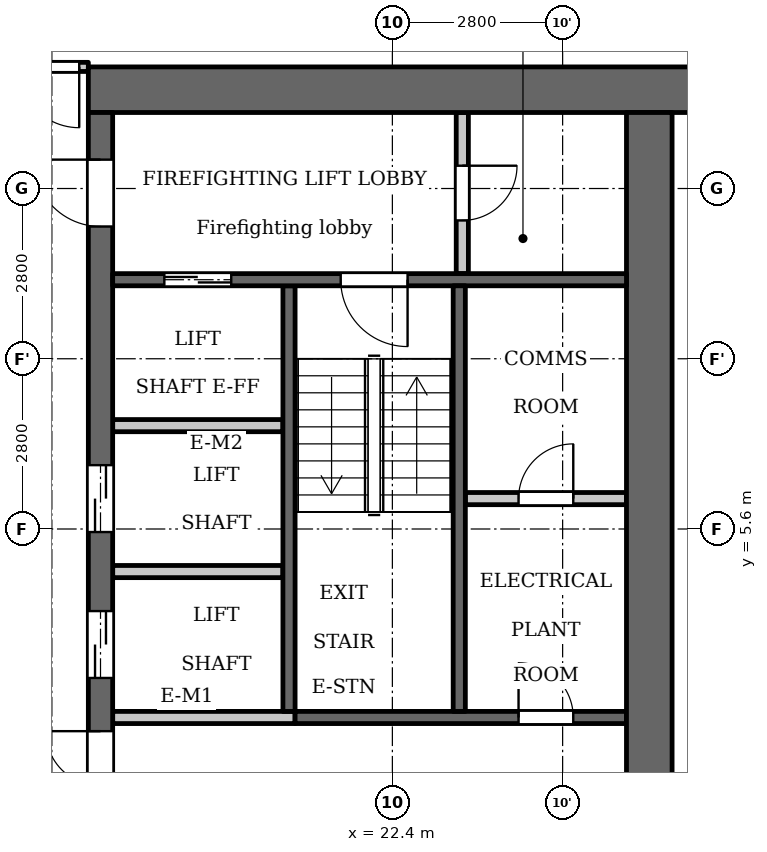
"""IFC4 building model, lengths in metres.
Left out: names, types, materials, properties, quantities, classifications, styles, units other than length and angle.
Written with IfcOpenShell. Run it as: python <this file> out.ifc"""

import sys

from ifc_helpers import new_model, si_unit, direction, frame, frame_2d, origin, place, context, subcontext, project, spatial, rectangle, extrude, element, fill, save


model = new_model("IFC4")
c1 = context("Model", 3, precision=1e-05, world=origin(), true_north=direction((0.0, 1.0)))
c2 = subcontext(c1, "Body", "Model", "MODEL_VIEW")
j1 = project(units=[si_unit("LENGTHUNIT", "METRE"), si_unit("PLANEANGLEUNIT", "RADIAN")], contexts=[c1])
p1 = place(None, origin())
s1 = spatial("IfcSite", under=j1, at=p1, CompositionType="ELEMENT")
p2 = place(p1, origin())
s2 = spatial("IfcBuilding", under=s1, at=p2, CompositionType="ELEMENT")
p3 = place(p2, frame((0.0, 0.0, 164.1)))
s3 = spatial("IfcBuildingStorey", under=s2, at=p3, CompositionType="ELEMENT", Elevation=164.1)
p4 = place(p3, frame((20.7, 2.6, 0.0), z_axis=(0.0, 0.0, 1.0), x_axis=(0.0, 1.0, 0.0)))
e1 = element("IfcWall", 1, at=p4, inside=s3, PredefinedType="SHEAR", context=c2, shape_type="SweptSolid", body=[
    extrude(rectangle(XDim=7.0, YDim=0.2, at=frame_2d((3.5, 0.0))), origin(), (0.0, 0.0, 1.0), 3.2),
])
p5 = place(p3, frame((20.8, 2.5, 0.0), z_axis=(0.0, 0.0, 1.0), x_axis=(1.0, 0.0, 0.0)))
e2 = element("IfcWall", 2, at=p5, inside=s3, PredefinedType="SHEAR", context=c2, shape_type="SweptSolid", body=[
    extrude(rectangle(XDim=5.45, YDim=0.2, at=frame_2d((2.725, 0.0))), origin(), (0.0, 0.0, 1.0), 3.2),
])
p6 = place(p5, frame((3.675, 0.0, 0.0)))
e3 = element("IfcOpeningElement", 3, at=p6, cuts=e2, PredefinedType="OPENING", context=c2, shape_type="SweptSolid", body=[
    extrude(rectangle(XDim=0.9, YDim=2.1, at=frame_2d((0.45, 1.05))), frame((0.0, 0.11, 0.0), z_axis=(0.0, -1.0, 0.0), x_axis=(1.0, 0.0, 0.0)), (0.0, 0.0, 1.0), 0.22),
])
p7 = place(p3, frame((17.4, 12.825, 0.0), z_axis=(0.0, 0.0, 1.0), x_axis=(1.0, 0.0, 0.0)))
e4 = element("IfcWall", 4, at=p7, inside=s3, PredefinedType="SHEAR", context=c2, shape_type="SweptSolid", body=[
    extrude(rectangle(XDim=10.4, YDim=0.75, at=frame_2d((5.2, 0.0))), origin(), (0.0, 0.0, 1.0), 3.2),
])
p8 = place(p3, frame((17.6, -12.45, 0.0), z_axis=(0.0, 0.0, 1.0), x_axis=(0.0, 1.0, 0.0)))
e5 = element("IfcWall", 5, at=p8, inside=s3, PredefinedType="SHEAR", context=c2, shape_type="SweptSolid", body=[
    extrude(rectangle(XDim=24.9, YDim=0.4, at=frame_2d((12.45, 0.0))), origin(), (0.0, 0.0, 1.0), 3.2),
])
p9 = place(p8, frame((8.65, 0.0, 0.0)))
e6 = element("IfcOpeningElement", 6, at=p9, cuts=e5, PredefinedType="OPENING", context=c2, shape_type="SweptSolid", body=[
    extrude(rectangle(XDim=0.9, YDim=2.1, at=frame_2d((0.45, 1.05))), frame((0.0, 0.21, 0.0), z_axis=(0.0, -1.0, 0.0), x_axis=(1.0, 0.0, 0.0)), (0.0, 0.0, 1.0), 0.42),
])
p10 = place(p8, frame((15.6, 0.0, 0.0)))
e7 = element("IfcOpeningElement", 7, at=p10, cuts=e5, PredefinedType="OPENING", context=c2, shape_type="SweptSolid", body=[
    extrude(rectangle(XDim=1.1, YDim=2.1, at=frame_2d((0.55, 1.05))), frame((0.0, 0.21, 0.0), z_axis=(0.0, -1.0, 0.0), x_axis=(1.0, 0.0, 0.0)), (0.0, 0.0, 1.0), 0.42),
])
p11 = place(p8, frame((18.0, 0.0, 0.0)))
e8 = element("IfcOpeningElement", 8, at=p11, cuts=e5, PredefinedType="OPENING", context=c2, shape_type="SweptSolid", body=[
    extrude(rectangle(XDim=1.1, YDim=2.1, at=frame_2d((0.55, 1.05))), frame((0.0, 0.21, 0.0), z_axis=(0.0, -1.0, 0.0), x_axis=(1.0, 0.0, 0.0)), (0.0, 0.0, 1.0), 0.42),
])
p12 = place(p8, frame((23.025, 0.0, 0.0)))
e9 = element("IfcOpeningElement", 9, at=p12, cuts=e5, PredefinedType="OPENING", context=c2, shape_type="SweptSolid", body=[
    extrude(rectangle(XDim=1.1, YDim=2.1, at=frame_2d((0.55, 1.05))), frame((0.0, 0.21, 0.0), z_axis=(0.0, -1.0, 0.0), x_axis=(1.0, 0.0, 0.0)), (0.0, 0.0, 1.0), 0.42),
])
p13 = place(p8, frame((0.775, 0.0, 0.0)))
e10 = element("IfcOpeningElement", 10, at=p13, cuts=e5, PredefinedType="OPENING", context=c2, shape_type="SweptSolid", body=[
    extrude(rectangle(XDim=1.1, YDim=2.1, at=frame_2d((0.55, 1.05))), frame((0.0, 0.21, 0.0), z_axis=(0.0, -1.0, 0.0), x_axis=(1.0, 0.0, 0.0)), (0.0, 0.0, 1.0), 0.42),
])
p14 = place(p8, frame((12.925, 0.0, 0.0)))
e11 = element("IfcOpeningElement", 11, at=p14, cuts=e5, PredefinedType="OPENING", context=c2, shape_type="SweptSolid", body=[
    extrude(rectangle(XDim=1.8, YDim=2.1, at=frame_2d((0.9, 1.05))), frame((0.0, 0.21, 0.0), z_axis=(0.0, -1.0, 0.0), x_axis=(1.0, 0.0, 0.0)), (0.0, 0.0, 1.0), 0.42),
])
p15 = place(p3, frame((26.625, -12.45, 0.0), z_axis=(0.0, 0.0, 1.0), x_axis=(0.0, 1.0, 0.0)))
e12 = element("IfcWall", 12, at=p15, inside=s3, PredefinedType="SHEAR", context=c2, shape_type="SweptSolid", body=[
    extrude(rectangle(XDim=24.9, YDim=0.75, at=frame_2d((12.45, 0.0))), origin(), (0.0, 0.0, 1.0), 3.2),
])
p16 = place(p3, frame((23.55, 9.8, 0.0), z_axis=(0.0, 0.0, 1.0), x_axis=(0.0, 1.0, 0.0)))
e13 = element("IfcWall", 13, at=p16, inside=s3, PredefinedType="PARTITIONING", context=c2, shape_type="SweptSolid", body=[
    extrude(rectangle(XDim=2.65, YDim=0.2, at=frame_2d((1.325, 0.0))), origin(), (0.0, 0.0, 1.0), 3.2),
])
p17 = place(p16, frame((0.875, 0.0, 0.0)))
e14 = element("IfcOpeningElement", 14, at=p17, cuts=e13, PredefinedType="OPENING", context=c2, shape_type="SweptSolid", body=[
    extrude(rectangle(XDim=0.9, YDim=2.1, at=frame_2d((0.45, 1.05))), frame((0.0, 0.11, 0.0), z_axis=(0.0, -1.0, 0.0), x_axis=(1.0, 0.0, 0.0)), (0.0, 0.0, 1.0), 0.22),
])
p18 = place(p3, frame((23.6, 6.1, 0.0), z_axis=(0.0, 0.0, 1.0), x_axis=(1.0, 0.0, 0.0)))
e15 = element("IfcWall", 15, at=p18, inside=s3, PredefinedType="PARTITIONING", context=c2, shape_type="SweptSolid", body=[
    extrude(rectangle(XDim=2.65, YDim=0.2, at=frame_2d((1.325, 0.0))), origin(), (0.0, 0.0, 1.0), 3.2),
])
p19 = place(p18, frame((0.875, 0.0, 0.0)))
e16 = element("IfcOpeningElement", 16, at=p19, cuts=e15, PredefinedType="OPENING", context=c2, shape_type="SweptSolid", body=[
    extrude(rectangle(XDim=0.9, YDim=2.1, at=frame_2d((0.45, 1.05))), frame((0.0, 0.11, 0.0), z_axis=(0.0, -1.0, 0.0), x_axis=(1.0, 0.0, 0.0)), (0.0, 0.0, 1.0), 0.22),
])
p20 = place(p3, frame((17.8, 2.5, 0.0), z_axis=(0.0, 0.0, 1.0), x_axis=(1.0, 0.0, 0.0)))
e17 = element("IfcWall", 17, at=p20, inside=s3, PredefinedType="PARTITIONING", context=c2, shape_type="SweptSolid", body=[
    extrude(rectangle(XDim=3.0, YDim=0.2, at=frame_2d((1.5, 0.0))), origin(), (0.0, 0.0, 1.0), 3.2),
])
for number, where, z_axis, x_axis in (
    (18, (17.8, 4.9, 0.0), (0.0, 0.0, 1.0), (1.0, 0.0, 0.0)),
    (19, (17.8, 7.3, 0.0), (0.0, 0.0, 1.0), (1.0, 0.0, 0.0)),
):
    element("IfcWall", number, at=place(p3, frame(where, z_axis=z_axis, x_axis=x_axis)), inside=s3, PredefinedType="PARTITIONING", context=c2, shape_type="SweptSolid", body=[
        extrude(rectangle(XDim=2.8, YDim=0.2, at=frame_2d((1.4, 0.0))), origin(), (0.0, 0.0, 1.0), 3.2),
    ])
p21 = place(p3, frame((17.8, 9.7, 0.0), z_axis=(0.0, 0.0, 1.0), x_axis=(1.0, 0.0, 0.0)))
e20 = element("IfcWall", 20, at=p21, inside=s3, PredefinedType="SHEAR", context=c2, shape_type="SweptSolid", body=[
    extrude(rectangle(XDim=8.45, YDim=0.2, at=frame_2d((4.225, 0.0))), origin(), (0.0, 0.0, 1.0), 3.2),
])
p22 = place(p21, frame((0.85, 0.0, 0.0)))
e21 = element("IfcOpeningElement", 21, at=p22, cuts=e20, PredefinedType="OPENING", context=c2, shape_type="SweptSolid", body=[
    extrude(rectangle(XDim=1.1, YDim=2.1, at=frame_2d((0.55, 1.05))), frame((0.0, 0.11, 0.0), z_axis=(0.0, -1.0, 0.0), x_axis=(1.0, 0.0, 0.0)), (0.0, 0.0, 1.0), 0.22),
])
p23 = place(p21, frame((3.75, 0.0, 0.0)))
e22 = element("IfcOpeningElement", 22, at=p23, cuts=e20, PredefinedType="OPENING", context=c2, shape_type="SweptSolid", body=[
    extrude(rectangle(XDim=1.1, YDim=2.1, at=frame_2d((0.55, 1.05))), frame((0.0, 0.11, 0.0), z_axis=(0.0, -1.0, 0.0), x_axis=(1.0, 0.0, 0.0)), (0.0, 0.0, 1.0), 0.22),
])
p24 = place(p3, frame((23.5, 2.6, 0.0), z_axis=(0.0, 0.0, 1.0), x_axis=(0.0, 1.0, 0.0)))
e23 = element("IfcWall", 23, at=p24, inside=s3, PredefinedType="SHEAR", context=c2, shape_type="SweptSolid", body=[
    extrude(rectangle(XDim=7.0, YDim=0.2, at=frame_2d((3.5, 0.0))), origin(), (0.0, 0.0, 1.0), 3.2),
])
p25 = place(p3, frame((-17.4, 13.2, 0.0), z_axis=(0.0, 0.0, 1.0), x_axis=(1.0, 0.0, 0.0)))
e24 = element("IfcWall", 24, at=p25, inside=s3, PredefinedType="PARTITIONING", context=c2, shape_type="SweptSolid", body=[
    extrude(rectangle(XDim=34.8, YDim=0.15, at=frame_2d((17.4, 0.0))), origin(), (0.0, 0.0, 1.0), 3.2),
])
p26 = place(p25, frame((0.25, 0.0, 0.0)))
e25 = element("IfcOpeningElement", 25, at=p26, cuts=e24, PredefinedType="OPENING", context=c2, shape_type="SweptSolid", body=[
    extrude(rectangle(XDim=1.0, YDim=2.1, at=frame_2d((0.5, 1.05))), frame((0.0, 0.085, 0.0), z_axis=(0.0, -1.0, 0.0), x_axis=(1.0, 0.0, 0.0)), (0.0, 0.0, 1.0), 0.17),
])
p27 = place(p25, frame((33.65, 0.0, 0.0)))
e26 = element("IfcOpeningElement", 26, at=p27, cuts=e24, PredefinedType="OPENING", context=c2, shape_type="SweptSolid", body=[
    extrude(rectangle(XDim=1.0, YDim=2.1, at=frame_2d((0.5, 1.05))), frame((0.0, 0.085, 0.0), z_axis=(0.0, -1.0, 0.0), x_axis=(1.0, 0.0, 0.0)), (0.0, 0.0, 1.0), 0.17),
])
p28 = place(p25, frame((15.75, 0.0, 0.0)))
e27 = element("IfcOpeningElement", 27, at=p28, cuts=e24, PredefinedType="OPENING", context=c2, shape_type="SweptSolid", body=[
    extrude(rectangle(XDim=1.0, YDim=2.1, at=frame_2d((0.5, 1.05))), frame((0.0, 0.085, 0.0), z_axis=(0.0, -1.0, 0.0), x_axis=(1.0, 0.0, 0.0)), (0.0, 0.0, 1.0), 0.17),
])
p29 = place(p25, frame((20.85, 0.0, 0.0)))
e28 = element("IfcOpeningElement", 28, at=p29, cuts=e24, PredefinedType="OPENING", context=c2, shape_type="SweptSolid", body=[
    extrude(rectangle(XDim=1.0, YDim=2.1, at=frame_2d((0.5, 1.05))), frame((0.0, 0.085, 0.0), z_axis=(0.0, -1.0, 0.0), x_axis=(1.0, 0.0, 0.0)), (0.0, 0.0, 1.0), 0.17),
])
p30 = place(p25, frame((23.55, 0.0, 0.0)))
e29 = element("IfcOpeningElement", 29, at=p30, cuts=e24, PredefinedType="OPENING", context=c2, shape_type="SweptSolid", body=[
    extrude(rectangle(XDim=1.0, YDim=2.1, at=frame_2d((0.5, 1.05))), frame((0.0, 0.085, 0.0), z_axis=(0.0, -1.0, 0.0), x_axis=(1.0, 0.0, 0.0)), (0.0, 0.0, 1.0), 0.17),
])
p31 = place(p10, origin())
e30 = element("IfcDoor", 30, at=p31, inside=s3, OperationType="DOUBLE_DOOR_SLIDING", PredefinedType="DOOR", context=c2, shape_type="SweptSolid", body=[
    extrude(rectangle(XDim=1.1, YDim=2.1, at=frame_2d((0.55, 1.05))), frame((0.0, 0.025, 0.0), z_axis=(0.0, -1.0, 0.0), x_axis=(1.0, 0.0, 0.0)), (0.0, 0.0, 1.0), 0.05),
])
fill(e7, e30)
p32 = place(p11, origin())
e31 = element("IfcDoor", 31, at=p32, inside=s3, OperationType="DOUBLE_DOOR_SLIDING", PredefinedType="DOOR", context=c2, shape_type="SweptSolid", body=[
    extrude(rectangle(XDim=1.1, YDim=2.1, at=frame_2d((0.55, 1.05))), frame((0.0, 0.025, 0.0), z_axis=(0.0, -1.0, 0.0), x_axis=(1.0, 0.0, 0.0)), (0.0, 0.0, 1.0), 0.05),
])
fill(e8, e31)
p33 = place(p22, origin())
e32 = element("IfcDoor", 32, at=p33, inside=s3, OperationType="DOUBLE_DOOR_SLIDING", PredefinedType="DOOR", context=c2, shape_type="SweptSolid", body=[
    extrude(rectangle(XDim=1.1, YDim=2.1, at=frame_2d((0.55, 1.05))), frame((0.0, 0.025, 0.0), z_axis=(0.0, -1.0, 0.0), x_axis=(1.0, 0.0, 0.0)), (0.0, 0.0, 1.0), 0.05),
])
fill(e21, e32)
p34 = place(p12, origin())
e33 = element("IfcDoor", 33, at=p34, inside=s3, OperationType="SINGLE_SWING_LEFT", PredefinedType="DOOR", context=c2, shape_type="SweptSolid", body=[
    extrude(rectangle(XDim=1.1, YDim=2.1, at=frame_2d((0.55, 1.05))), frame((0.0, 0.025, 0.0), z_axis=(0.0, -1.0, 0.0), x_axis=(1.0, 0.0, 0.0)), (0.0, 0.0, 1.0), 0.05),
])
fill(e9, e33)
p35 = place(p17, origin())
e34 = element("IfcDoor", 34, at=p35, inside=s3, OperationType="SINGLE_SWING_RIGHT", PredefinedType="DOOR", context=c2, shape_type="SweptSolid", body=[
    extrude(rectangle(XDim=0.9, YDim=2.1, at=frame_2d((0.45, 1.05))), frame((0.0, 0.025, 0.0), z_axis=(0.0, -1.0, 0.0), x_axis=(1.0, 0.0, 0.0)), (0.0, 0.0, 1.0), 0.05),
])
fill(e14, e34)
p36 = place(p23, origin())
e35 = element("IfcDoor", 35, at=p36, inside=s3, OperationType="SINGLE_SWING_RIGHT", PredefinedType="DOOR", context=c2, shape_type="SweptSolid", body=[
    extrude(rectangle(XDim=1.1, YDim=2.1, at=frame_2d((0.55, 1.05))), frame((0.0, 0.025, 0.0), z_axis=(0.0, -1.0, 0.0), x_axis=(1.0, 0.0, 0.0)), (0.0, 0.0, 1.0), 0.05),
])
fill(e22, e35)
p37 = place(p14, origin())
e36 = element("IfcDoor", 36, at=p37, inside=s3, OperationType="DOUBLE_DOOR_SINGLE_SWING", PredefinedType="DOOR", context=c2, shape_type="SweptSolid", body=[
    extrude(rectangle(XDim=1.8, YDim=2.1, at=frame_2d((0.9, 1.05))), frame((0.0, 0.025, 0.0), z_axis=(0.0, -1.0, 0.0), x_axis=(1.0, 0.0, 0.0)), (0.0, 0.0, 1.0), 0.05),
])
fill(e11, e36)
p38 = place(p19, origin())
e37 = element("IfcDoor", 37, at=p38, inside=s3, OperationType="SINGLE_SWING_LEFT", PredefinedType="DOOR", context=c2, shape_type="SweptSolid", body=[
    extrude(rectangle(XDim=0.9, YDim=2.1, at=frame_2d((0.45, 1.05))), frame((0.0, 0.025, 0.0), z_axis=(0.0, -1.0, 0.0), x_axis=(1.0, 0.0, 0.0)), (0.0, 0.0, 1.0), 0.05),
])
fill(e16, e37)
p39 = place(p6, origin())
e38 = element("IfcDoor", 38, at=p39, inside=s3, OperationType="SINGLE_SWING_RIGHT", PredefinedType="DOOR", context=c2, shape_type="SweptSolid", body=[
    extrude(rectangle(XDim=0.9, YDim=2.1, at=frame_2d((0.45, 1.05))), frame((0.0, 0.025, 0.0), z_axis=(0.0, -1.0, 0.0), x_axis=(1.0, 0.0, 0.0)), (0.0, 0.0, 1.0), 0.05),
])
fill(e3, e38)
p40 = place(p27, origin())
e39 = element("IfcDoor", 39, at=p40, inside=s3, OperationType="SINGLE_SWING_RIGHT", PredefinedType="DOOR", context=c2, shape_type="SweptSolid", body=[
    extrude(rectangle(XDim=1.0, YDim=2.1, at=frame_2d((0.5, 1.05))), frame((0.0, 0.025, 0.0), z_axis=(0.0, -1.0, 0.0), x_axis=(1.0, 0.0, 0.0)), (0.0, 0.0, 1.0), 0.05),
])
fill(e26, e39)
save(model, sys.argv[1])
